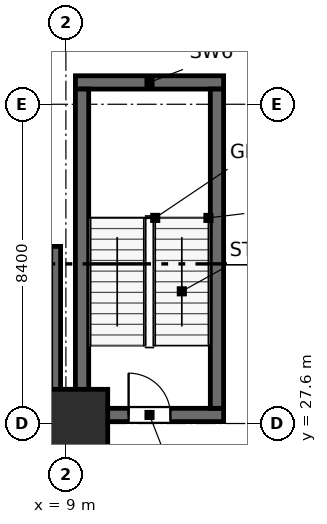
"""IFC4 building model, lengths in metres.
Left out: names, types, materials, properties, quantities, classifications, styles, units other than length and angle.
Written with IfcOpenShell. Run it as: python <this file> out.ifc"""

import sys

from ifc_helpers import new_model, si_unit, direction, frame, frame_2d, origin, origin_2d, place, context, subcontext, project, spatial, rectangle, extrude, element, fill, save


model = new_model("IFC4")
c1 = context("Model", 3, precision=1e-05, world=origin(), true_north=direction((0.0, 1.0)))
c2 = subcontext(c1, "Body", "Model", "MODEL_VIEW")
j1 = project(units=[si_unit("LENGTHUNIT", "METRE"), si_unit("PLANEANGLEUNIT", "RADIAN")], contexts=[c1])
p1 = place(None, origin())
s1 = spatial("IfcSite", under=j1, at=p1, CompositionType="ELEMENT")
p2 = place(p1, origin())
s2 = spatial("IfcBuilding", under=s1, at=p2, CompositionType="ELEMENT")
p3 = place(p2, frame((0.0, 0.0, -9.0)))
s3 = spatial("IfcBuildingStorey", under=s2, at=p3, CompositionType="ELEMENT", Elevation=-9.0)
p4 = place(p3, frame((8.73, 4.74, 0.0), z_axis=(0.0, 0.0, 1.0), x_axis=(0.0, 1.0, 0.0)))
e1 = element("IfcWall", 1, at=p4, inside=s3, PredefinedType="SHEAR", context=c2, shape_type="SweptSolid", body=[
    extrude(rectangle(XDim=27.52, YDim=0.26, at=frame_2d((13.76, 0.0))), origin(), (0.0, 0.0, 1.0), 4.18),
])
p5 = place(p3, frame((9.25, 27.825, 0.0), z_axis=(0.0, 0.0, 1.0), x_axis=(1.0, 0.0, 0.0)))
e2 = element("IfcWall", 2, at=p5, inside=s3, PredefinedType="SHEAR", context=c2, shape_type="SweptSolid", body=[
    extrude(rectangle(XDim=3.9, YDim=0.35, at=frame_2d((1.95, 0.0))), origin(), (0.0, 0.0, 1.0), 4.5),
])
p6 = place(p5, frame((1.4, 0.0, 0.0)))
e3 = element("IfcOpeningElement", 3, at=p6, cuts=e2, PredefinedType="OPENING", context=c2, shape_type="SweptSolid", body=[
    extrude(rectangle(XDim=1.1, YDim=2.05, at=frame_2d((0.55, 1.025))), frame((0.0, 0.185, 0.0), z_axis=(0.0, -1.0, 0.0), x_axis=(1.0, 0.0, 0.0)), (0.0, 0.0, 1.0), 0.37),
])
p7 = place(p3, frame((9.25, 36.575, 0.0), z_axis=(0.0, 0.0, 1.0), x_axis=(1.0, 0.0, 0.0)))
e4 = element("IfcWall", 4, at=p7, inside=s3, PredefinedType="SHEAR", context=c2, shape_type="SweptSolid", body=[
    extrude(rectangle(XDim=3.9, YDim=0.35, at=frame_2d((1.95, 0.0))), origin(), (0.0, 0.0, 1.0), 4.5),
])
for number, where, z_axis, x_axis in (
    (5, (9.425, 28.0, 0.0), (0.0, 0.0, 1.0), (0.0, 1.0, 0.0)),
    (6, (12.975, 28.0, 0.0), (0.0, 0.0, 1.0), (0.0, 1.0, 0.0)),
):
    element("IfcWall", number, at=place(p3, frame(where, z_axis=z_axis, x_axis=x_axis)), inside=s3, PredefinedType="SHEAR", context=c2, shape_type="SweptSolid", body=[
        extrude(rectangle(XDim=8.4, YDim=0.35, at=frame_2d((4.2, 0.0))), origin(), (0.0, 0.0, 1.0), 4.5),
    ])
p8 = place(p3, frame((9.2, 27.6, 0.0), z_axis=(0.0, 0.0, 1.0), x_axis=(1.0, 0.0, 0.0)))
e7 = element("IfcColumn", 7, at=p8, inside=s3, PredefinedType="COLUMN", context=c2, shape_type="SweptSolid", body=[
    extrude(rectangle(XDim=1.8, YDim=1.8, at=origin_2d()), origin(), (0.0, 0.0, 1.0), 4.5),
])
p9 = place(p6, origin())
e8 = element("IfcDoor", 8, at=p9, inside=s3, OperationType="SINGLE_SWING_LEFT", PredefinedType="DOOR", context=c2, shape_type="SweptSolid", body=[
    extrude(rectangle(XDim=1.1, YDim=2.05, at=frame_2d((0.55, 1.025))), frame((0.0, 0.025, 0.0), z_axis=(0.0, -1.0, 0.0), x_axis=(1.0, 0.0, 0.0)), (0.0, 0.0, 1.0), 0.05),
])
fill(e3, e8)
save(model, sys.argv[1])
